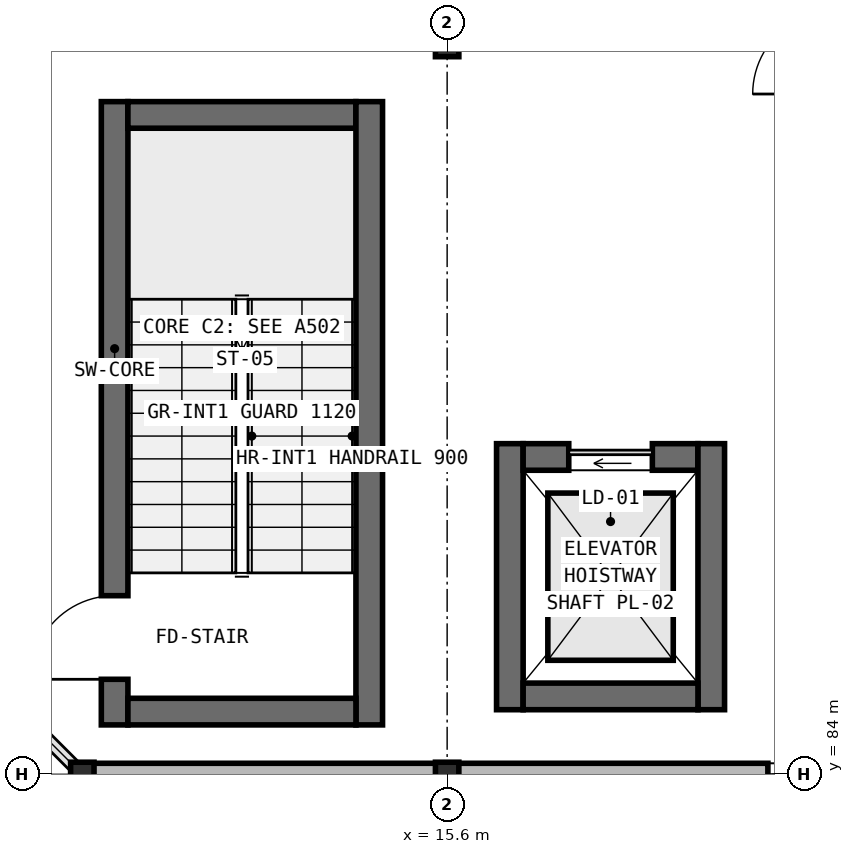
"""IFC4 building model, lengths in metres.
Left out: names, types, materials, properties, quantities, classifications, styles, units other than length and angle.
Written with IfcOpenShell. Run it as: python <this file> out.ifc"""

import sys

from ifc_helpers import new_model, si_unit, direction, frame, frame_2d, origin, origin_2d, place, context, subcontext, project, spatial, rectangle, i_section, extrude, element, fill, save


model = new_model("IFC4")
c1 = context("Model", 3, precision=1e-05, world=origin(), true_north=direction((0.0, 1.0)))
c2 = subcontext(c1, "Body", "Model", "MODEL_VIEW")
j1 = project(units=[si_unit("LENGTHUNIT", "METRE"), si_unit("PLANEANGLEUNIT", "RADIAN")], contexts=[c1])
p1 = place(None, origin())
s1 = spatial("IfcSite", under=j1, at=p1, CompositionType="ELEMENT")
p2 = place(p1, origin())
s2 = spatial("IfcBuilding", under=s1, at=p2, CompositionType="ELEMENT")
p3 = place(p2, frame((0.0, 0.0, 23.45)))
s3 = spatial("IfcBuildingStorey", under=s2, at=p3, CompositionType="ELEMENT", Elevation=23.45)
p4 = place(p3, frame((11.225, 84.65, 0.0), z_axis=(0.0, 0.0, 1.0), x_axis=(0.0, 1.0, 0.0)))
e1 = element("IfcWall", 1, at=p4, inside=s3, PredefinedType="SHEAR", context=c2, shape_type="SweptSolid", body=[
    extrude(rectangle(XDim=8.2, YDim=0.35, at=frame_2d((4.1, 0.0))), origin(), (0.0, 0.0, 1.0), 4.55),
])
p5 = place(p4, frame((0.6, 0.0, 0.0)))
e2 = element("IfcOpeningElement", 2, at=p5, cuts=e1, PredefinedType="OPENING", context=c2, shape_type="SweptSolid", body=[
    extrude(rectangle(XDim=1.1, YDim=2.15, at=frame_2d((0.55, 1.075))), frame((0.0, 0.185, 0.0), z_axis=(0.0, -1.0, 0.0), x_axis=(1.0, 0.0, 0.0)), (0.0, 0.0, 1.0), 0.37),
])
p6 = place(p3, frame((11.4, 92.675, 0.0), z_axis=(0.0, 0.0, 1.0), x_axis=(1.0, 0.0, 0.0)))
e3 = element("IfcWall", 3, at=p6, inside=s3, PredefinedType="SHEAR", context=c2, shape_type="SweptSolid", body=[
    extrude(rectangle(XDim=3.0, YDim=0.35, at=frame_2d((1.5, 0.0))), origin(), (0.0, 0.0, 1.0), 4.55),
])
p7 = place(p3, frame((14.575, 92.85, 0.0), z_axis=(0.0, 0.0, 1.0), x_axis=(0.0, -1.0, 0.0)))
e4 = element("IfcWall", 4, at=p7, inside=s3, PredefinedType="SHEAR", context=c2, shape_type="SweptSolid", body=[
    extrude(rectangle(XDim=8.2, YDim=0.35, at=frame_2d((4.1, 0.0))), origin(), (0.0, 0.0, 1.0), 4.55),
])
p8 = place(p3, frame((14.4, 84.825, 0.0), z_axis=(0.0, 0.0, 1.0), x_axis=(-1.0, 0.0, 0.0)))
e5 = element("IfcWall", 5, at=p8, inside=s3, PredefinedType="SHEAR", context=c2, shape_type="SweptSolid", body=[
    extrude(rectangle(XDim=3.0, YDim=0.35, at=frame_2d((1.5, 0.0))), origin(), (0.0, 0.0, 1.0), 4.55),
])
p9 = place(p3, frame((16.425, 84.85, 0.0), z_axis=(0.0, 0.0, 1.0), x_axis=(0.0, 1.0, 0.0)))
e6 = element("IfcWall", 6, at=p9, inside=s3, PredefinedType="SHEAR", context=c2, shape_type="SweptSolid", body=[
    extrude(rectangle(XDim=3.5, YDim=0.35, at=frame_2d((1.75, 0.0))), origin(), (0.0, 0.0, 1.0), 4.55),
])
p10 = place(p3, frame((16.6, 88.175, 0.0), z_axis=(0.0, 0.0, 1.0), x_axis=(1.0, 0.0, 0.0)))
e7 = element("IfcWall", 7, at=p10, inside=s3, PredefinedType="SHEAR", context=c2, shape_type="SweptSolid", body=[
    extrude(rectangle(XDim=2.3, YDim=0.35, at=frame_2d((1.15, 0.0))), origin(), (0.0, 0.0, 1.0), 4.55),
])
p11 = place(p10, frame((0.6, 0.0, 0.0)))
e8 = element("IfcOpeningElement", 8, at=p11, cuts=e7, PredefinedType="OPENING", context=c2, shape_type="SweptSolid", body=[
    extrude(rectangle(XDim=1.1, YDim=2.15, at=frame_2d((0.55, 1.075))), frame((0.0, 0.185, 0.0), z_axis=(0.0, -1.0, 0.0), x_axis=(1.0, 0.0, 0.0)), (0.0, 0.0, 1.0), 0.37),
])
p12 = place(p3, frame((19.075, 88.35, 0.0), z_axis=(0.0, 0.0, 1.0), x_axis=(0.0, -1.0, 0.0)))
e9 = element("IfcWall", 9, at=p12, inside=s3, PredefinedType="SHEAR", context=c2, shape_type="SweptSolid", body=[
    extrude(rectangle(XDim=3.5, YDim=0.35, at=frame_2d((1.75, 0.0))), origin(), (0.0, 0.0, 1.0), 4.55),
])
p13 = place(p3, frame((18.9, 85.025, 0.0), z_axis=(0.0, 0.0, 1.0), x_axis=(-1.0, 0.0, 0.0)))
e10 = element("IfcWall", 10, at=p13, inside=s3, PredefinedType="SHEAR", context=c2, shape_type="SweptSolid", body=[
    extrude(rectangle(XDim=2.3, YDim=0.35, at=frame_2d((1.15, 0.0))), origin(), (0.0, 0.0, 1.0), 4.55),
])
for number, where, z_axis, x_axis in (
    (11, (15.6, 84.0, 0.0), (0.0, 0.0, 1.0), (1.0, 0.0, 0.0)),
    (12, (15.6, 93.6, 0.0), (0.0, 0.0, 1.0), (1.0, 0.0, 0.0)),
    (13, (10.8, 84.0, 0.0), (0.0, 0.0, 1.0), (1.0, 0.0, 0.0)),
):
    element("IfcColumn", number, at=place(p3, frame(where, z_axis=z_axis, x_axis=x_axis)), inside=s3, PredefinedType="COLUMN", context=c2, shape_type="SweptSolid", body=[
        extrude(i_section(OverallWidth=0.308, OverallDepth=0.318, WebThickness=0.013, FlangeThickness=0.021, at=origin_2d()), origin(), (0.0, 0.0, 1.0), 4.55),
    ])
p14 = place(p3, frame((25.196, 84.0, 0.0), z_axis=(0.0, 0.0, 1.0), x_axis=(-1.0, 0.0, 0.0)))
e14 = element("IfcWall", 14, at=p14, inside=s3, PredefinedType="SOLIDWALL", context=c2, shape_type="SweptSolid", body=[
    extrude(rectangle(XDim=9.592, YDim=0.29, at=frame_2d((4.796, 0.0))), origin(), (0.0, 0.0, 1.0), 3.822),
])
p15 = place(p14, frame((4.216, 0.0, 0.95)))
e15 = element("IfcOpeningElement", 15, at=p15, cuts=e14, PredefinedType="OPENING", context=c2, shape_type="SweptSolid", body=[
    extrude(rectangle(XDim=1.16, YDim=1.35, at=frame_2d((0.58, 0.675))), frame((0.0, 0.155, 0.0), z_axis=(0.0, -1.0, 0.0), x_axis=(1.0, 0.0, 0.0)), (0.0, 0.0, 1.0), 0.31),
])
p16 = place(p3, frame((15.596, 84.0, 0.0), z_axis=(0.0, 0.0, 1.0), x_axis=(-1.0, 0.0, 0.0)))
e16 = element("IfcWall", 16, at=p16, inside=s3, PredefinedType="SOLIDWALL", context=c2, shape_type="SweptSolid", body=[
    extrude(rectangle(XDim=4.792, YDim=0.29, at=frame_2d((2.396, 0.0))), origin(), (0.0, 0.0, 1.0), 4.31),
])
p17 = place(p15, origin())
e17 = element("IfcWindow", 17, at=p17, inside=s3, PartitioningType="SINGLE_PANEL", PredefinedType="WINDOW", context=c2, shape_type="SweptSolid", body=[
    extrude(rectangle(XDim=1.16, YDim=1.35, at=frame_2d((0.58, 0.675))), frame((0.0, 0.03, 0.0), z_axis=(0.0, -1.0, 0.0), x_axis=(1.0, 0.0, 0.0)), (0.0, 0.0, 1.0), 0.06),
])
fill(e15, e17)
p18 = place(p5, origin())
e18 = element("IfcDoor", 18, at=p18, inside=s3, OperationType="SINGLE_SWING_LEFT", PredefinedType="DOOR", context=c2, shape_type="SweptSolid", body=[
    extrude(rectangle(XDim=1.1, YDim=2.15, at=frame_2d((0.55, 1.075))), frame((0.0, 0.025, 0.0), z_axis=(0.0, -1.0, 0.0), x_axis=(1.0, 0.0, 0.0)), (0.0, 0.0, 1.0), 0.05),
])
fill(e2, e18)
p19 = place(p11, origin())
e19 = element("IfcDoor", 19, at=p19, inside=s3, OperationType="SLIDING_TO_LEFT", PredefinedType="USERDEFINED", context=c2, shape_type="SweptSolid", body=[
    extrude(rectangle(XDim=1.1, YDim=2.15, at=frame_2d((0.55, 1.075))), frame((0.0, 0.025, 0.0), z_axis=(0.0, -1.0, 0.0), x_axis=(1.0, 0.0, 0.0)), (0.0, 0.0, 1.0), 0.05),
])
fill(e8, e19)
save(model, sys.argv[1])
